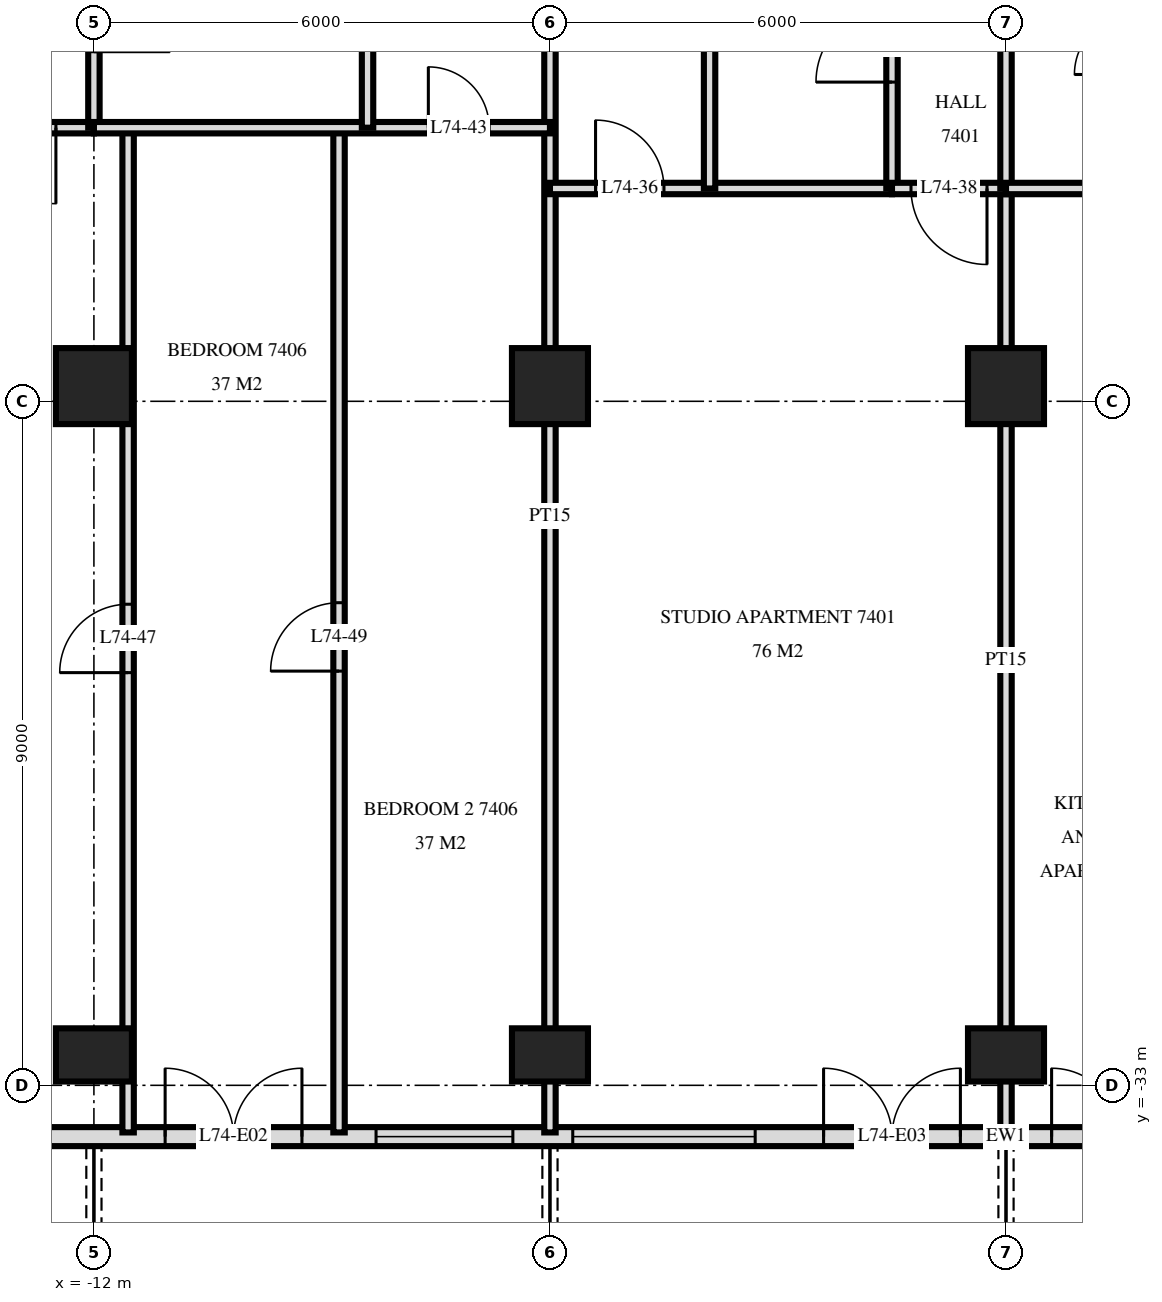
"""IFC4 building model, lengths in metres.
Left out: names, types, materials, properties, quantities, classifications, styles, units other than length and angle.
Written with IfcOpenShell. Run it as: python <this file> out.ifc"""

import sys

from ifc_helpers import new_model, si_unit, direction, frame, frame_2d, origin, origin_2d, place, context, subcontext, project, spatial, rectangle, extrude, element, fill, save


model = new_model("IFC4")
c1 = context("Model", 3, precision=1e-05, world=origin(), true_north=direction((0.0, 1.0)))
c2 = subcontext(c1, "Body", "Model", "MODEL_VIEW")
j1 = project(units=[si_unit("LENGTHUNIT", "METRE"), si_unit("PLANEANGLEUNIT", "RADIAN")], contexts=[c1])
p1 = place(None, origin())
s1 = spatial("IfcSite", under=j1, at=p1, CompositionType="ELEMENT")
p2 = place(p1, origin())
s2 = spatial("IfcBuilding", under=s1, at=p2, CompositionType="ELEMENT")
p3 = place(p2, frame((0.0, 0.0, 280.6)))
s3 = spatial("IfcBuildingStorey", under=s2, at=p3, CompositionType="ELEMENT", Elevation=280.6)
p4 = place(p3, frame((-12.0, -32.6, 0.0), z_axis=(0.0, 0.0, 1.0), x_axis=(1.0, 0.0, 0.0)))
e1 = element("IfcColumn", 1, at=p4, inside=s3, PredefinedType="COLUMN", context=c2, shape_type="SweptSolid", body=[
    extrude(rectangle(XDim=1.0, YDim=0.7, at=origin_2d()), origin(), (0.0, 0.0, 1.0), 3.5),
])
p5 = place(p3, frame((-12.0, -23.8, 0.0), z_axis=(0.0, 0.0, 1.0), x_axis=(1.0, 0.0, 0.0)))
e2 = element("IfcColumn", 2, at=p5, inside=s3, PredefinedType="COLUMN", context=c2, shape_type="SweptSolid", body=[
    extrude(rectangle(XDim=1.0, YDim=1.0, at=origin_2d()), origin(), (0.0, 0.0, 1.0), 3.5),
])
p6 = place(p3, frame((-6.0, -32.6, 0.0), z_axis=(0.0, 0.0, 1.0), x_axis=(1.0, 0.0, 0.0)))
e3 = element("IfcColumn", 3, at=p6, inside=s3, PredefinedType="COLUMN", context=c2, shape_type="SweptSolid", body=[
    extrude(rectangle(XDim=1.0, YDim=0.7, at=origin_2d()), origin(), (0.0, 0.0, 1.0), 3.5),
])
p7 = place(p3, frame((-6.0, -23.8, 0.0), z_axis=(0.0, 0.0, 1.0), x_axis=(1.0, 0.0, 0.0)))
e4 = element("IfcColumn", 4, at=p7, inside=s3, PredefinedType="COLUMN", context=c2, shape_type="SweptSolid", body=[
    extrude(rectangle(XDim=1.0, YDim=1.0, at=origin_2d()), origin(), (0.0, 0.0, 1.0), 3.5),
])
p8 = place(p3, frame((0.0, -32.6, 0.0), z_axis=(0.0, 0.0, 1.0), x_axis=(1.0, 0.0, 0.0)))
e5 = element("IfcColumn", 5, at=p8, inside=s3, PredefinedType="COLUMN", context=c2, shape_type="SweptSolid", body=[
    extrude(rectangle(XDim=1.0, YDim=0.7, at=origin_2d()), origin(), (0.0, 0.0, 1.0), 3.5),
])
p9 = place(p3, frame((0.0, -23.8, 0.0), z_axis=(0.0, 0.0, 1.0), x_axis=(1.0, 0.0, 0.0)))
e6 = element("IfcColumn", 6, at=p9, inside=s3, PredefinedType="COLUMN", context=c2, shape_type="SweptSolid", body=[
    extrude(rectangle(XDim=1.0, YDim=1.0, at=origin_2d()), origin(), (0.0, 0.0, 1.0), 3.5),
])
p10 = place(p3, frame((-18.575, -33.675, 0.0), z_axis=(0.0, 0.0, 1.0), x_axis=(1.0, 0.0, 0.0)))
e7 = element("IfcWall", 7, at=p10, inside=s3, PredefinedType="SOLIDWALL", context=c2, shape_type="SweptSolid", body=[
    extrude(rectangle(XDim=37.151, YDim=0.25, at=frame_2d((18.575, 0.0))), origin(), (0.0, 0.0, 1.0), 3.22),
])
p11 = place(p10, frame((4.175, 0.0, 0.0)))
e8 = element("IfcOpeningElement", 8, at=p11, cuts=e7, PredefinedType="OPENING", context=c2, shape_type="SweptSolid", body=[
    extrude(rectangle(XDim=1.8, YDim=2.4, at=frame_2d((0.9, 1.2))), frame((0.0, 0.135, 0.0), z_axis=(0.0, -1.0, 0.0), x_axis=(1.0, 0.0, 0.0)), (0.0, 0.0, 1.0), 0.27),
])
p12 = place(p10, frame((7.512, 0.0, 0.0)))
e9 = element("IfcOpeningElement", 9, at=p12, cuts=e7, PredefinedType="OPENING", context=c2, shape_type="SweptSolid", body=[
    extrude(rectangle(XDim=1.8, YDim=2.4, at=frame_2d((0.9, 1.2))), frame((0.0, 0.135, 0.0), z_axis=(0.0, -1.0, 0.0), x_axis=(1.0, 0.0, 0.0)), (0.0, 0.0, 1.0), 0.27),
])
p13 = place(p10, frame((10.287, 0.0, 0.9)))
e10 = element("IfcOpeningElement", 10, at=p13, cuts=e7, PredefinedType="OPENING", context=c2, shape_type="SweptSolid", body=[
    extrude(rectangle(XDim=1.8, YDim=1.5, at=frame_2d((0.9, 0.75))), frame((0.0, 0.135, 0.0), z_axis=(0.0, -1.0, 0.0), x_axis=(1.0, 0.0, 0.0)), (0.0, 0.0, 1.0), 0.27),
])
p14 = place(p10, frame((12.875, 0.0, 0.9)))
e11 = element("IfcOpeningElement", 11, at=p14, cuts=e7, PredefinedType="OPENING", context=c2, shape_type="SweptSolid", body=[
    extrude(rectangle(XDim=2.4, YDim=1.5, at=frame_2d((1.2, 0.75))), frame((0.0, 0.135, 0.0), z_axis=(0.0, -1.0, 0.0), x_axis=(1.0, 0.0, 0.0)), (0.0, 0.0, 1.0), 0.27),
])
p15 = place(p10, frame((16.175, 0.0, 0.0)))
e12 = element("IfcOpeningElement", 12, at=p15, cuts=e7, PredefinedType="OPENING", context=c2, shape_type="SweptSolid", body=[
    extrude(rectangle(XDim=1.8, YDim=2.4, at=frame_2d((0.9, 1.2))), frame((0.0, 0.135, 0.0), z_axis=(0.0, -1.0, 0.0), x_axis=(1.0, 0.0, 0.0)), (0.0, 0.0, 1.0), 0.27),
])
p16 = place(p10, frame((19.175, 0.0, 0.0)))
e13 = element("IfcOpeningElement", 13, at=p16, cuts=e7, PredefinedType="OPENING", context=c2, shape_type="SweptSolid", body=[
    extrude(rectangle(XDim=1.8, YDim=2.4, at=frame_2d((0.9, 1.2))), frame((0.0, 0.135, 0.0), z_axis=(0.0, -1.0, 0.0), x_axis=(1.0, 0.0, 0.0)), (0.0, 0.0, 1.0), 0.27),
])
p17 = place(p10, frame((21.875, 0.0, 0.9)))
e14 = element("IfcOpeningElement", 14, at=p17, cuts=e7, PredefinedType="OPENING", context=c2, shape_type="SweptSolid", body=[
    extrude(rectangle(XDim=2.4, YDim=1.5, at=frame_2d((1.2, 0.75))), frame((0.0, 0.135, 0.0), z_axis=(0.0, -1.0, 0.0), x_axis=(1.0, 0.0, 0.0)), (0.0, 0.0, 1.0), 0.27),
])
p18 = place(p10, frame((25.175, 0.0, 0.0)))
e15 = element("IfcOpeningElement", 15, at=p18, cuts=e7, PredefinedType="OPENING", context=c2, shape_type="SweptSolid", body=[
    extrude(rectangle(XDim=1.8, YDim=2.4, at=frame_2d((0.9, 1.2))), frame((0.0, 0.135, 0.0), z_axis=(0.0, -1.0, 0.0), x_axis=(1.0, 0.0, 0.0)), (0.0, 0.0, 1.0), 0.27),
])
p19 = place(p10, frame((27.875, 0.0, 0.9)))
e16 = element("IfcOpeningElement", 16, at=p19, cuts=e7, PredefinedType="OPENING", context=c2, shape_type="SweptSolid", body=[
    extrude(rectangle(XDim=2.4, YDim=1.5, at=frame_2d((1.2, 0.75))), frame((0.0, 0.135, 0.0), z_axis=(0.0, -1.0, 0.0), x_axis=(1.0, 0.0, 0.0)), (0.0, 0.0, 1.0), 0.27),
])
p20 = place(p10, frame((30.95, 0.0, 0.9)))
e17 = element("IfcOpeningElement", 17, at=p20, cuts=e7, PredefinedType="OPENING", context=c2, shape_type="SweptSolid", body=[
    extrude(rectangle(XDim=1.8, YDim=1.5, at=frame_2d((0.9, 0.75))), frame((0.0, 0.135, 0.0), z_axis=(0.0, -1.0, 0.0), x_axis=(1.0, 0.0, 0.0)), (0.0, 0.0, 1.0), 0.27),
])
p21 = place(p10, frame((34.175, 0.0, 0.0)))
e18 = element("IfcOpeningElement", 18, at=p21, cuts=e7, PredefinedType="OPENING", context=c2, shape_type="SweptSolid", body=[
    extrude(rectangle(XDim=1.8, YDim=2.4, at=frame_2d((0.9, 1.2))), frame((0.0, 0.135, 0.0), z_axis=(0.0, -1.0, 0.0), x_axis=(1.0, 0.0, 0.0)), (0.0, 0.0, 1.0), 0.27),
])
p22 = place(p3, frame((0.0, -21.2, 0.0), z_axis=(0.0, 0.0, 1.0), x_axis=(0.0, 1.0, 0.0)))
e19 = element("IfcWall", 19, at=p22, inside=s3, PredefinedType="PARTITIONING", context=c2, shape_type="SweptSolid", body=[
    extrude(rectangle(XDim=3.8, YDim=0.15, at=frame_2d((1.9, 0.0))), origin(), (0.0, 0.0, 1.0), 3.22),
])
p23 = place(p3, frame((0.0, -33.62, 0.0), z_axis=(0.0, 0.0, 1.0), x_axis=(0.0, 1.0, 0.0)))
e20 = element("IfcWall", 20, at=p23, inside=s3, PredefinedType="PARTITIONING", context=c2, shape_type="SweptSolid", body=[
    extrude(rectangle(XDim=12.42, YDim=0.15, at=frame_2d((6.21, 0.0))), origin(), (0.0, 0.0, 1.0), 3.22),
])
p24 = place(p3, frame((-1.5, -21.2, 0.0), z_axis=(0.0, 0.0, 1.0), x_axis=(0.0, 1.0, 0.0)))
e21 = element("IfcWall", 21, at=p24, inside=s3, PredefinedType="PARTITIONING", context=c2, shape_type="SweptSolid", body=[
    extrude(rectangle(XDim=3.8, YDim=0.15, at=frame_2d((1.9, 0.0))), origin(), (0.0, 0.0, 1.0), 3.22),
])
p25 = place(p24, frame((1.4, 0.0, 0.0)))
e22 = element("IfcOpeningElement", 22, at=p25, cuts=e21, PredefinedType="OPENING", context=c2, shape_type="SweptSolid", body=[
    extrude(rectangle(XDim=1.0, YDim=2.1, at=frame_2d((0.5, 1.05))), frame((0.0, 0.085, 0.0), z_axis=(0.0, -1.0, 0.0), x_axis=(1.0, 0.0, 0.0)), (0.0, 0.0, 1.0), 0.17),
])
p26 = place(p3, frame((-3.9, -21.2, 0.0), z_axis=(0.0, 0.0, 1.0), x_axis=(0.0, 1.0, 0.0)))
e23 = element("IfcWall", 23, at=p26, inside=s3, PredefinedType="PARTITIONING", context=c2, shape_type="SweptSolid", body=[
    extrude(rectangle(XDim=3.8, YDim=0.15, at=frame_2d((1.9, 0.0))), origin(), (0.0, 0.0, 1.0), 3.22),
])
p27 = place(p3, frame((-6.0, -33.62, 0.0), z_axis=(0.0, 0.0, 1.0), x_axis=(0.0, 1.0, 0.0)))
e24 = element("IfcWall", 24, at=p27, inside=s3, PredefinedType="PARTITIONING", context=c2, shape_type="SweptSolid", body=[
    extrude(rectangle(XDim=16.22, YDim=0.15, at=frame_2d((8.11, 0.0))), origin(), (0.0, 0.0, 1.0), 3.22),
])
p28 = place(p3, frame((-8.4, -20.4, 0.0), z_axis=(0.0, 0.0, 1.0), x_axis=(0.0, 1.0, 0.0)))
e25 = element("IfcWall", 25, at=p28, inside=s3, PredefinedType="PARTITIONING", context=c2, shape_type="SweptSolid", body=[
    extrude(rectangle(XDim=3.0, YDim=0.15, at=frame_2d((1.5, 0.0))), origin(), (0.0, 0.0, 1.0), 3.22),
])
p29 = place(p3, frame((-8.775, -33.62, 0.0), z_axis=(0.0, 0.0, 1.0), x_axis=(0.0, 1.0, 0.0)))
e26 = element("IfcWall", 26, at=p29, inside=s3, PredefinedType="PARTITIONING", context=c2, shape_type="SweptSolid", body=[
    extrude(rectangle(XDim=13.22, YDim=0.15, at=frame_2d((6.61, 0.0))), origin(), (0.0, 0.0, 1.0), 3.22),
])
p30 = place(p29, frame((6.07, 0.0, 0.0)))
e27 = element("IfcOpeningElement", 27, at=p30, cuts=e26, PredefinedType="OPENING", context=c2, shape_type="SweptSolid", body=[
    extrude(rectangle(XDim=0.9, YDim=2.1, at=frame_2d((0.45, 1.05))), frame((0.0, 0.085, 0.0), z_axis=(0.0, -1.0, 0.0), x_axis=(1.0, 0.0, 0.0)), (0.0, 0.0, 1.0), 0.17),
])
p31 = place(p3, frame((-11.55, -33.62, 0.0), z_axis=(0.0, 0.0, 1.0), x_axis=(0.0, 1.0, 0.0)))
e28 = element("IfcWall", 28, at=p31, inside=s3, PredefinedType="PARTITIONING", context=c2, shape_type="SweptSolid", body=[
    extrude(rectangle(XDim=13.22, YDim=0.15, at=frame_2d((6.61, 0.0))), origin(), (0.0, 0.0, 1.0), 3.22),
])
p32 = place(p31, frame((6.05, 0.0, 0.0)))
e29 = element("IfcOpeningElement", 29, at=p32, cuts=e28, PredefinedType="OPENING", context=c2, shape_type="SweptSolid", body=[
    extrude(rectangle(XDim=0.9, YDim=2.1, at=frame_2d((0.45, 1.05))), frame((0.0, 0.085, 0.0), z_axis=(0.0, -1.0, 0.0), x_axis=(1.0, 0.0, 0.0)), (0.0, 0.0, 1.0), 0.17),
])
p33 = place(p3, frame((-12.0, -20.4, 0.0), z_axis=(0.0, 0.0, 1.0), x_axis=(0.0, 1.0, 0.0)))
e30 = element("IfcWall", 30, at=p33, inside=s3, PredefinedType="PARTITIONING", context=c2, shape_type="SweptSolid", body=[
    extrude(rectangle(XDim=3.0, YDim=0.15, at=frame_2d((1.5, 0.0))), origin(), (0.0, 0.0, 1.0), 3.22),
])
p34 = place(p33, frame((1.0, 0.0, 0.0)))
e31 = element("IfcOpeningElement", 31, at=p34, cuts=e30, PredefinedType="OPENING", context=c2, shape_type="SweptSolid", body=[
    extrude(rectangle(XDim=1.0, YDim=2.1, at=frame_2d((0.5, 1.05))), frame((0.0, 0.085, 0.0), z_axis=(0.0, -1.0, 0.0), x_axis=(1.0, 0.0, 0.0)), (0.0, 0.0, 1.0), 0.17),
])
p35 = place(p3, frame((-1.5, -21.2, 0.0), z_axis=(0.0, 0.0, 1.0), x_axis=(1.0, 0.0, 0.0)))
e32 = element("IfcWall", 32, at=p35, inside=s3, PredefinedType="PARTITIONING", context=c2, shape_type="SweptSolid", body=[
    extrude(rectangle(XDim=1.5, YDim=0.15, at=frame_2d((0.75, 0.0))), origin(), (0.0, 0.0, 1.0), 3.22),
])
p36 = place(p35, frame((0.25, 0.0, 0.0)))
e33 = element("IfcOpeningElement", 33, at=p36, cuts=e32, PredefinedType="OPENING", context=c2, shape_type="SweptSolid", body=[
    extrude(rectangle(XDim=1.0, YDim=2.1, at=frame_2d((0.5, 1.05))), frame((0.0, 0.085, 0.0), z_axis=(0.0, -1.0, 0.0), x_axis=(1.0, 0.0, 0.0)), (0.0, 0.0, 1.0), 0.17),
])
p37 = place(p3, frame((-6.0, -21.2, 0.0), z_axis=(0.0, 0.0, 1.0), x_axis=(1.0, 0.0, 0.0)))
e34 = element("IfcWall", 34, at=p37, inside=s3, PredefinedType="PARTITIONING", context=c2, shape_type="SweptSolid", body=[
    extrude(rectangle(XDim=4.5, YDim=0.15, at=frame_2d((2.25, 0.0))), origin(), (0.0, 0.0, 1.0), 3.22),
])
p38 = place(p37, frame((0.6, 0.0, 0.0)))
e35 = element("IfcOpeningElement", 35, at=p38, cuts=e34, PredefinedType="OPENING", context=c2, shape_type="SweptSolid", body=[
    extrude(rectangle(XDim=0.9, YDim=2.1, at=frame_2d((0.45, 1.05))), frame((0.0, 0.085, 0.0), z_axis=(0.0, -1.0, 0.0), x_axis=(1.0, 0.0, 0.0)), (0.0, 0.0, 1.0), 0.17),
])
p39 = place(p3, frame((0.0, -21.2, 0.0), z_axis=(0.0, 0.0, 1.0), x_axis=(1.0, 0.0, 0.0)))
e36 = element("IfcWall", 36, at=p39, inside=s3, PredefinedType="PARTITIONING", context=c2, shape_type="SweptSolid", body=[
    extrude(rectangle(XDim=1.7, YDim=0.15, at=frame_2d((0.85, 0.0))), origin(), (0.0, 0.0, 1.0), 3.22),
])
p40 = place(p3, frame((-14.0, -20.4, 0.0), z_axis=(0.0, 0.0, 1.0), x_axis=(1.0, 0.0, 0.0)))
e37 = element("IfcWall", 37, at=p40, inside=s3, PredefinedType="PARTITIONING", context=c2, shape_type="SweptSolid", body=[
    extrude(rectangle(XDim=2.0, YDim=0.15, at=frame_2d((1.0, 0.0))), origin(), (0.0, 0.0, 1.0), 3.22),
])
p41 = place(p40, frame((0.5, 0.0, 0.0)))
e38 = element("IfcOpeningElement", 38, at=p41, cuts=e37, PredefinedType="OPENING", context=c2, shape_type="SweptSolid", body=[
    extrude(rectangle(XDim=1.0, YDim=2.1, at=frame_2d((0.5, 1.05))), frame((0.0, 0.085, 0.0), z_axis=(0.0, -1.0, 0.0), x_axis=(1.0, 0.0, 0.0)), (0.0, 0.0, 1.0), 0.17),
])
p42 = place(p3, frame((-12.0, -20.4, 0.0), z_axis=(0.0, 0.0, 1.0), x_axis=(1.0, 0.0, 0.0)))
e39 = element("IfcWall", 39, at=p42, inside=s3, PredefinedType="PARTITIONING", context=c2, shape_type="SweptSolid", body=[
    extrude(rectangle(XDim=6.0, YDim=0.15, at=frame_2d((3.0, 0.0))), origin(), (0.0, 0.0, 1.0), 3.22),
])
p43 = place(p42, frame((4.4, 0.0, 0.0)))
e40 = element("IfcOpeningElement", 40, at=p43, cuts=e39, PredefinedType="OPENING", context=c2, shape_type="SweptSolid", body=[
    extrude(rectangle(XDim=0.8, YDim=2.1, at=frame_2d((0.4, 1.05))), frame((0.0, 0.085, 0.0), z_axis=(0.0, -1.0, 0.0), x_axis=(1.0, 0.0, 0.0)), (0.0, 0.0, 1.0), 0.17),
])
p44 = place(p12, origin())
e41 = element("IfcDoor", 41, at=p44, inside=s3, OperationType="DOUBLE_DOOR_SINGLE_SWING", PredefinedType="DOOR", context=c2, shape_type="SweptSolid", body=[
    extrude(rectangle(XDim=1.8, YDim=2.4, at=frame_2d((0.9, 1.2))), frame((0.0, 0.025, 0.0), z_axis=(0.0, -1.0, 0.0), x_axis=(1.0, 0.0, 0.0)), (0.0, 0.0, 1.0), 0.05),
])
fill(e9, e41)
p45 = place(p13, origin())
e42 = element("IfcWindow", 42, at=p45, inside=s3, PartitioningType="SINGLE_PANEL", PredefinedType="WINDOW", context=c2, shape_type="SweptSolid", body=[
    extrude(rectangle(XDim=1.8, YDim=1.5, at=frame_2d((0.9, 0.75))), frame((0.0, 0.03, 0.0), z_axis=(0.0, -1.0, 0.0), x_axis=(1.0, 0.0, 0.0)), (0.0, 0.0, 1.0), 0.06),
])
fill(e10, e42)
p46 = place(p14, origin())
e43 = element("IfcWindow", 43, at=p46, inside=s3, PartitioningType="SINGLE_PANEL", PredefinedType="WINDOW", context=c2, shape_type="SweptSolid", body=[
    extrude(rectangle(XDim=2.4, YDim=1.5, at=frame_2d((1.2, 0.75))), frame((0.0, 0.03, 0.0), z_axis=(0.0, -1.0, 0.0), x_axis=(1.0, 0.0, 0.0)), (0.0, 0.0, 1.0), 0.06),
])
fill(e11, e43)
p47 = place(p15, origin())
e44 = element("IfcDoor", 44, at=p47, inside=s3, OperationType="DOUBLE_DOOR_SINGLE_SWING", PredefinedType="DOOR", context=c2, shape_type="SweptSolid", body=[
    extrude(rectangle(XDim=1.8, YDim=2.4, at=frame_2d((0.9, 1.2))), frame((0.0, 0.025, 0.0), z_axis=(0.0, -1.0, 0.0), x_axis=(1.0, 0.0, 0.0)), (0.0, 0.0, 1.0), 0.05),
])
fill(e12, e44)
p48 = place(p16, origin())
e45 = element("IfcDoor", 45, at=p48, inside=s3, OperationType="DOUBLE_DOOR_SINGLE_SWING", PredefinedType="DOOR", context=c2, shape_type="SweptSolid", body=[
    extrude(rectangle(XDim=1.8, YDim=2.4, at=frame_2d((0.9, 1.2))), frame((0.0, 0.025, 0.0), z_axis=(0.0, -1.0, 0.0), x_axis=(1.0, 0.0, 0.0)), (0.0, 0.0, 1.0), 0.05),
])
fill(e13, e45)
p49 = place(p38, origin())
e46 = element("IfcDoor", 46, at=p49, inside=s3, OperationType="SINGLE_SWING_RIGHT", PredefinedType="DOOR", context=c2, shape_type="SweptSolid", body=[
    extrude(rectangle(XDim=0.9, YDim=2.1, at=frame_2d((0.45, 1.05))), frame((0.0, 0.025, 0.0), z_axis=(0.0, -1.0, 0.0), x_axis=(1.0, 0.0, 0.0)), (0.0, 0.0, 1.0), 0.05),
])
fill(e35, e46)
p50 = place(p25, origin())
e47 = element("IfcDoor", 47, at=p50, inside=s3, OperationType="SINGLE_SWING_RIGHT", PredefinedType="DOOR", context=c2, shape_type="SweptSolid", body=[
    extrude(rectangle(XDim=1.0, YDim=2.1, at=frame_2d((0.5, 1.05))), frame((0.0, 0.025, 0.0), z_axis=(0.0, -1.0, 0.0), x_axis=(1.0, 0.0, 0.0)), (0.0, 0.0, 1.0), 0.05),
])
fill(e22, e47)
p51 = place(p36, frame((0.5, 0.0, 0.0), z_axis=(0.0, 0.0, 1.0), x_axis=(-1.0, 0.0, 0.0)))
e48 = element("IfcDoor", 48, at=p51, inside=s3, OperationType="SINGLE_SWING_RIGHT", PredefinedType="DOOR", context=c2, shape_type="SweptSolid", body=[
    extrude(rectangle(XDim=1.0, YDim=2.1, at=frame_2d((0.0, 1.05))), frame((0.0, -0.025, 0.0), z_axis=(0.0, 1.0, 0.0), x_axis=(-1.0, 0.0, 0.0)), (0.0, 0.0, 1.0), 0.05),
])
fill(e33, e48)
p52 = place(p43, origin())
e49 = element("IfcDoor", 49, at=p52, inside=s3, OperationType="SINGLE_SWING_RIGHT", PredefinedType="DOOR", context=c2, shape_type="SweptSolid", body=[
    extrude(rectangle(XDim=0.8, YDim=2.1, at=frame_2d((0.4, 1.05))), frame((0.0, 0.025, 0.0), z_axis=(0.0, -1.0, 0.0), x_axis=(1.0, 0.0, 0.0)), (0.0, 0.0, 1.0), 0.05),
])
fill(e40, e49)
p53 = place(p41, frame((0.5, 0.0, 0.0), z_axis=(0.0, 0.0, 1.0), x_axis=(-1.0, 0.0, 0.0)))
e50 = element("IfcDoor", 50, at=p53, inside=s3, OperationType="SINGLE_SWING_RIGHT", PredefinedType="DOOR", context=c2, shape_type="SweptSolid", body=[
    extrude(rectangle(XDim=1.0, YDim=2.1, at=frame_2d((0.0, 1.05))), frame((0.0, -0.025, 0.0), z_axis=(0.0, 1.0, 0.0), x_axis=(-1.0, 0.0, 0.0)), (0.0, 0.0, 1.0), 0.05),
])
fill(e38, e50)
p54 = place(p32, origin())
e51 = element("IfcDoor", 51, at=p54, inside=s3, OperationType="SINGLE_SWING_RIGHT", PredefinedType="DOOR", context=c2, shape_type="SweptSolid", body=[
    extrude(rectangle(XDim=0.9, YDim=2.1, at=frame_2d((0.45, 1.05))), frame((0.0, 0.025, 0.0), z_axis=(0.0, -1.0, 0.0), x_axis=(1.0, 0.0, 0.0)), (0.0, 0.0, 1.0), 0.05),
])
fill(e29, e51)
p55 = place(p30, origin())
e52 = element("IfcDoor", 52, at=p55, inside=s3, OperationType="SINGLE_SWING_RIGHT", PredefinedType="DOOR", context=c2, shape_type="SweptSolid", body=[
    extrude(rectangle(XDim=0.9, YDim=2.1, at=frame_2d((0.45, 1.05))), frame((0.0, 0.025, 0.0), z_axis=(0.0, -1.0, 0.0), x_axis=(1.0, 0.0, 0.0)), (0.0, 0.0, 1.0), 0.05),
])
fill(e27, e52)
save(model, sys.argv[1])
